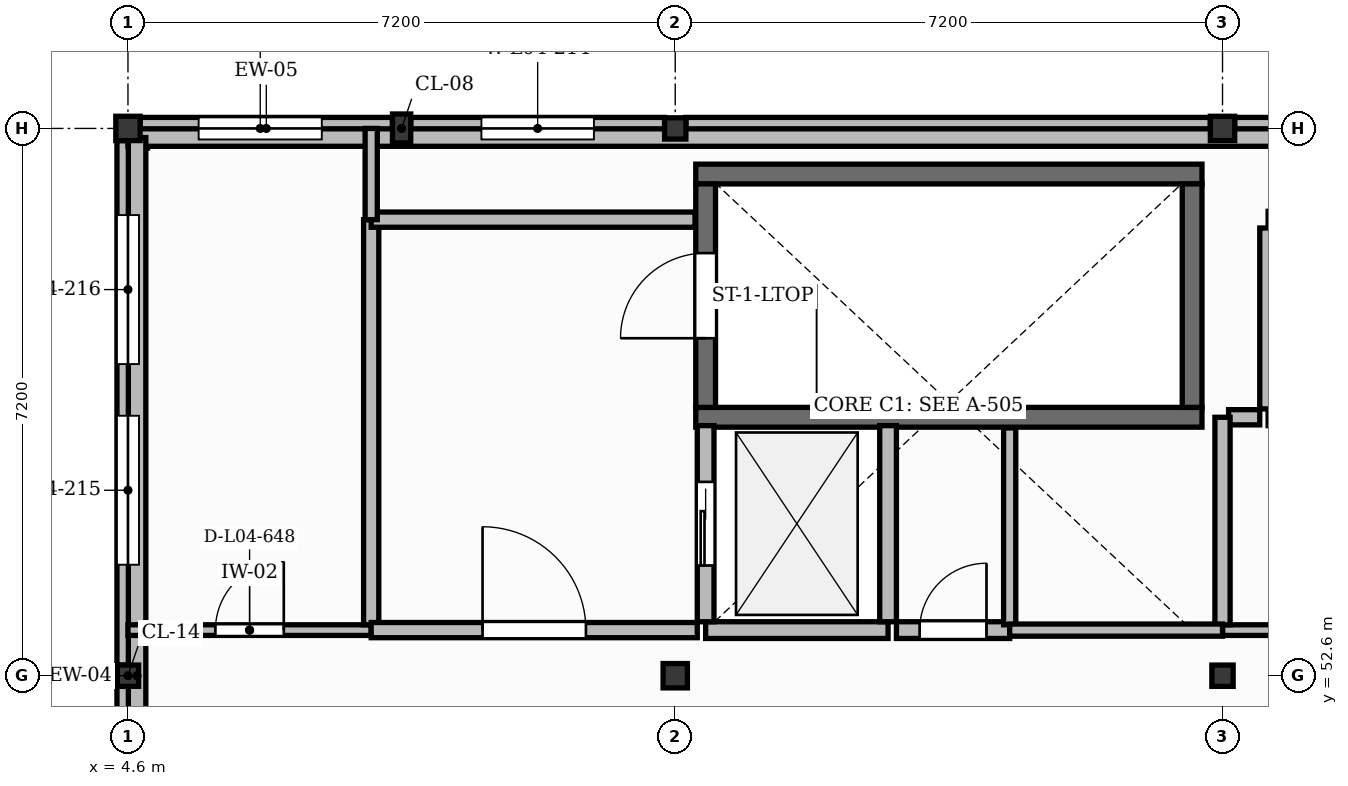
"""IFC4 building model, lengths in metres.
Left out: names, types, materials, properties, quantities, classifications, styles, units other than length and angle.
Written with IfcOpenShell. Run it as: python <this file> out.ifc"""

import sys

from ifc_helpers import new_model, si_unit, direction, frame, frame_2d, origin, origin_2d, place, context, subcontext, project, spatial, polyline, rectangle, outline, extrude, element, fill, save


model = new_model("IFC4")
c1 = context("Model", 3, precision=1e-05, world=origin(), true_north=direction((0.0, 1.0)))
c2 = subcontext(c1, "Body", "Model", "MODEL_VIEW")
j1 = project(units=[si_unit("LENGTHUNIT", "METRE"), si_unit("PLANEANGLEUNIT", "RADIAN")], contexts=[c1])
p1 = place(None, origin())
s1 = spatial("IfcSite", under=j1, at=p1, CompositionType="ELEMENT")
p2 = place(p1, origin())
s2 = spatial("IfcBuilding", under=s1, at=p2, CompositionType="ELEMENT")
p3 = place(p2, frame((0.0, 0.0, 17.4)))
s3 = spatial("IfcBuildingStorey", under=s2, at=p3, CompositionType="ELEMENT", Elevation=17.4)
p4 = place(p3, frame((4.6, 52.6, 0.0), z_axis=(0.0, 0.0, 1.0), x_axis=(1.0, 0.0, 0.0)))
e1 = element("IfcColumn", 1, at=p4, inside=s3, PredefinedType="COLUMN", context=c2, shape_type="SweptSolid", body=[
    extrude(rectangle(XDim=0.28, YDim=0.28, at=origin_2d()), origin(), (0.0, 0.0, 1.0), 3.95),
])
for number, where, z_axis, x_axis in (
    (2, (4.6, 59.8, 0.0), (0.0, 0.0, 1.0), (1.0, 0.0, 0.0)),
    (3, (11.8, 52.6, 0.0), (0.0, 0.0, 1.0), (1.0, 0.0, 0.0)),
):
    element("IfcColumn", number, at=place(p3, frame(where, z_axis=z_axis, x_axis=x_axis)), inside=s3, PredefinedType="COLUMN", context=c2, shape_type="SweptSolid", body=[
        extrude(rectangle(XDim=0.32, YDim=0.32, at=origin_2d()), origin(), (0.0, 0.0, 1.0), 3.95),
    ])
for number, where, z_axis, x_axis in (
    (4, (11.8, 59.8, 0.0), (0.0, 0.0, 1.0), (1.0, 0.0, 0.0)),
    (5, (19.0, 52.6, 0.0), (0.0, 0.0, 1.0), (1.0, 0.0, 0.0)),
):
    element("IfcColumn", number, at=place(p3, frame(where, z_axis=z_axis, x_axis=x_axis)), inside=s3, PredefinedType="COLUMN", context=c2, shape_type="SweptSolid", body=[
        extrude(rectangle(XDim=0.28, YDim=0.28, at=origin_2d()), origin(), (0.0, 0.0, 1.0), 3.95),
    ])
p5 = place(p3, frame((19.0, 59.8, 0.0), z_axis=(0.0, 0.0, 1.0), x_axis=(1.0, 0.0, 0.0)))
e6 = element("IfcColumn", 6, at=p5, inside=s3, PredefinedType="COLUMN", context=c2, shape_type="SweptSolid", body=[
    extrude(rectangle(XDim=0.32, YDim=0.32, at=origin_2d()), origin(), (0.0, 0.0, 1.0), 3.95),
])
p6 = place(p3, frame((8.2, 59.8, 0.0), z_axis=(0.0, 0.0, 1.0), x_axis=(1.0, 0.0, 0.0)))
e7 = element("IfcColumn", 7, at=p6, inside=s3, PredefinedType="PILASTER", context=c2, shape_type="SweptSolid", body=[
    extrude(rectangle(XDim=0.24, YDim=0.38, at=origin_2d()), origin(), (0.0, 0.0, 1.0), 3.95),
])
p7 = place(p3, frame((4.6, 45.56, 0.0), z_axis=(0.0, 0.0, 1.0), x_axis=(0.0, 1.0, 0.0)))
e8 = element("IfcWall", 8, at=p7, inside=s3, PredefinedType="SOLIDWALL", context=c2, shape_type="SweptSolid", body=[
    extrude(rectangle(XDim=6.9, YDim=0.29, at=frame_2d((3.45, 0.0))), origin(), (0.0, 0.0, 1.0), 3.49),
])
p8 = place(p7, frame((1.81, 0.0, 1.05)))
e9 = element("IfcOpeningElement", 9, at=p8, cuts=e8, PredefinedType="OPENING", context=c2, shape_type="SweptSolid", body=[
    extrude(rectangle(XDim=1.54, YDim=1.65, at=frame_2d((0.77, 0.825))), frame((0.0, 0.155, 0.0), z_axis=(0.0, -1.0, 0.0), x_axis=(1.0, 0.0, 0.0)), (0.0, 0.0, 1.0), 0.31),
])
p9 = place(p3, frame((4.76, 59.8, 0.0), z_axis=(0.0, 0.0, 1.0), x_axis=(1.0, 0.0, 0.0)))
e10 = element("IfcWall", 10, at=p9, inside=s3, PredefinedType="SOLIDWALL", context=c2, shape_type="SweptSolid", body=[
    extrude(rectangle(XDim=3.32, YDim=0.29, at=frame_2d((1.66, 0.0))), origin(), (0.0, 0.0, 1.0), 3.49),
])
p10 = place(p9, frame((0.77, 0.0, 1.0)))
e11 = element("IfcOpeningElement", 11, at=p10, cuts=e10, PredefinedType="OPENING", context=c2, shape_type="SweptSolid", body=[
    extrude(rectangle(XDim=1.62, YDim=1.95, at=frame_2d((0.81, 0.975))), frame((0.0, 0.155, 0.0), z_axis=(0.0, -1.0, 0.0), x_axis=(1.0, 0.0, 0.0)), (0.0, 0.0, 1.0), 0.31),
])
p11 = place(p3, frame((8.32, 59.8, 0.0), z_axis=(0.0, 0.0, 1.0), x_axis=(1.0, 0.0, 0.0)))
e12 = element("IfcWall", 12, at=p11, inside=s3, PredefinedType="SOLIDWALL", context=c2, shape_type="SweptSolid", body=[
    extrude(rectangle(XDim=3.34, YDim=0.29, at=frame_2d((1.67, 0.0))), origin(), (0.0, 0.0, 1.0), 3.49),
])
p12 = place(p11, frame((0.93, 0.0, 1.0)))
e13 = element("IfcOpeningElement", 13, at=p12, cuts=e12, PredefinedType="OPENING", context=c2, shape_type="SweptSolid", body=[
    extrude(rectangle(XDim=1.48, YDim=1.95, at=frame_2d((0.74, 0.975))), frame((0.0, 0.155, 0.0), z_axis=(0.0, -1.0, 0.0), x_axis=(1.0, 0.0, 0.0)), (0.0, 0.0, 1.0), 0.31),
])
p13 = place(p3, frame((4.6, 52.74, 0.0), z_axis=(0.0, 0.0, 1.0), x_axis=(0.0, 1.0, 0.0)))
e14 = element("IfcWall", 14, at=p13, inside=s3, PredefinedType="SOLIDWALL", context=c2, shape_type="SweptSolid", body=[
    extrude(rectangle(XDim=6.9, YDim=0.29, at=frame_2d((3.45, 0.0))), origin(), (0.0, 0.0, 1.0), 3.49),
])
p14 = place(p13, frame((1.32, 0.0, 1.05)))
e15 = element("IfcOpeningElement", 15, at=p14, cuts=e14, PredefinedType="OPENING", context=c2, shape_type="SweptSolid", body=[
    extrude(rectangle(XDim=1.96, YDim=1.65, at=frame_2d((0.98, 0.825))), frame((0.0, 0.155, 0.0), z_axis=(0.0, -1.0, 0.0), x_axis=(1.0, 0.0, 0.0)), (0.0, 0.0, 1.0), 0.31),
])
p15 = place(p13, frame((3.96, 0.0, 1.05)))
e16 = element("IfcOpeningElement", 16, at=p15, cuts=e14, PredefinedType="OPENING", context=c2, shape_type="SweptSolid", body=[
    extrude(rectangle(XDim=1.96, YDim=1.65, at=frame_2d((0.98, 0.825))), frame((0.0, 0.155, 0.0), z_axis=(0.0, -1.0, 0.0), x_axis=(1.0, 0.0, 0.0)), (0.0, 0.0, 1.0), 0.31),
])
p16 = place(p3, frame((11.94, 59.8, 0.0), z_axis=(0.0, 0.0, 1.0), x_axis=(1.0, 0.0, 0.0)))
e17 = element("IfcWall", 17, at=p16, inside=s3, PredefinedType="SOLIDWALL", context=c2, shape_type="SweptSolid", body=[
    extrude(rectangle(XDim=6.9, YDim=0.29, at=frame_2d((3.45, 0.0))), origin(), (0.0, 0.0, 1.0), 3.49),
])
p17 = place(p3, frame((19.16, 59.8, 0.0), z_axis=(0.0, 0.0, 1.0), x_axis=(1.0, 0.0, 0.0)))
e18 = element("IfcWall", 18, at=p17, inside=s3, PredefinedType="SOLIDWALL", context=c2, shape_type="SweptSolid", body=[
    extrude(rectangle(XDim=3.32, YDim=0.29, at=frame_2d((1.66, 0.0))), origin(), (0.0, 0.0, 1.0), 3.49),
])
p18 = place(p17, frame((0.75, 0.0, 1.05)))
e19 = element("IfcOpeningElement", 19, at=p18, cuts=e18, PredefinedType="OPENING", context=c2, shape_type="SweptSolid", body=[
    extrude(rectangle(XDim=1.26, YDim=1.65, at=frame_2d((0.63, 0.825))), frame((0.0, 0.155, 0.0), z_axis=(0.0, -1.0, 0.0), x_axis=(1.0, 0.0, 0.0)), (0.0, 0.0, 1.0), 0.31),
])
p19 = place(p3, frame((4.6, 59.68, 4.2), z_axis=(0.0, 0.0, 1.0), x_axis=(1.0, 0.0, 0.0)))
e20 = element("IfcWall", 20, at=p19, inside=s3, PredefinedType="PARAPET", context=c2, shape_type="SweptSolid", body=[
    extrude(outline(polyline([(0.0, 0.0), (50.4, 0.0), (50.4, 0.65), (39.312, 0.925), (39.312, 0.65), (32.256, 1.2), (32.256, 0.925), (18.144, 1.2), (18.144, 0.925), (11.088, 0.925), (11.088, 0.65), (0.0, 0.65), (0.0, 0.0)])), frame((0.0, 0.115, 0.0), z_axis=(0.0, -1.0, 0.0), x_axis=(1.0, 0.0, 0.0)), (0.0, 0.0, 1.0), 0.23),
])
p20 = place(p3, frame((4.72, 45.52, 4.2), z_axis=(0.0, 0.0, 1.0), x_axis=(0.0, 1.0, 0.0)))
e21 = element("IfcWall", 21, at=p20, inside=s3, PredefinedType="PARAPET", context=c2, shape_type="SweptSolid", body=[
    extrude(outline(polyline([(0.0, 0.0), (14.16, 0.0), (14.16, 0.65), (11.045, 0.9), (11.045, 0.65), (9.062, 1.15), (9.062, 0.9), (5.098, 1.15), (5.098, 0.9), (3.115, 0.9), (3.115, 0.65), (0.0, 0.65), (0.0, 0.0)])), frame((0.0, 0.115, 0.0), z_axis=(0.0, -1.0, 0.0), x_axis=(1.0, 0.0, 0.0)), (0.0, 0.0, 1.0), 0.23),
])
for number, where, z_axis, x_axis in (
    (22, (12.07, 56.0, 0.0), (0.0, 0.0, 1.0), (1.0, 0.0, 0.0)),
    (23, (12.07, 59.2, 0.0), (0.0, 0.0, 1.0), (1.0, 0.0, 0.0)),
):
    element("IfcWall", number, at=place(p3, frame(where, z_axis=z_axis, x_axis=x_axis)), inside=s3, PredefinedType="SHEAR", context=c2, shape_type="SweptSolid", body=[
        extrude(rectangle(XDim=6.66, YDim=0.26, at=frame_2d((3.33, 0.0))), origin(), (0.0, 0.0, 1.0), 3.95),
    ])
p21 = place(p3, frame((12.2, 56.13, 0.0), z_axis=(0.0, 0.0, 1.0), x_axis=(0.0, 1.0, 0.0)))
e24 = element("IfcWall", 24, at=p21, inside=s3, PredefinedType="SHEAR", context=c2, shape_type="SweptSolid", body=[
    extrude(rectangle(XDim=2.94, YDim=0.26, at=frame_2d((1.47, 0.0))), origin(), (0.0, 0.0, 1.0), 3.95),
])
p22 = place(p21, frame((0.91, 0.0, 0.0)))
e25 = element("IfcOpeningElement", 25, at=p22, cuts=e24, PredefinedType="OPENING", context=c2, shape_type="SweptSolid", body=[
    extrude(rectangle(XDim=1.12, YDim=2.1, at=frame_2d((0.56, 1.05))), frame((0.0, 0.14, 0.0), z_axis=(0.0, -1.0, 0.0), x_axis=(1.0, 0.0, 0.0)), (0.0, 0.0, 1.0), 0.28),
])
p23 = place(p3, frame((18.6, 56.13, 0.0), z_axis=(0.0, 0.0, 1.0), x_axis=(0.0, 1.0, 0.0)))
e26 = element("IfcWall", 26, at=p23, inside=s3, PredefinedType="SHEAR", context=c2, shape_type="SweptSolid", body=[
    extrude(rectangle(XDim=2.94, YDim=0.26, at=frame_2d((1.47, 0.0))), origin(), (0.0, 0.0, 1.0), 3.95),
])
p24 = place(p3, frame((12.2, 53.2, 0.0), z_axis=(0.0, 0.0, 1.0), x_axis=(1.0, 0.0, 0.0)))
e27 = element("IfcWall", 27, at=p24, inside=s3, PredefinedType="SOLIDWALL", context=c2, shape_type="SweptSolid", body=[
    extrude(rectangle(XDim=2.4, YDim=0.22, at=frame_2d((1.2, 0.0))), origin(), (0.0, 0.0, 1.0), 3.95),
])
p25 = place(p3, frame((12.2, 53.31, 0.0), z_axis=(0.0, 0.0, 1.0), x_axis=(0.0, 1.0, 0.0)))
e28 = element("IfcWall", 28, at=p25, inside=s3, PredefinedType="SOLIDWALL", context=c2, shape_type="SweptSolid", body=[
    extrude(rectangle(XDim=2.58, YDim=0.22, at=frame_2d((1.29, 0.0))), origin(), (0.0, 0.0, 1.0), 3.95),
])
p26 = place(p25, frame((0.74, 0.0, 0.0)))
e29 = element("IfcOpeningElement", 29, at=p26, cuts=e28, PredefinedType="OPENING", context=c2, shape_type="SweptSolid", body=[
    extrude(rectangle(XDim=1.1, YDim=2.15, at=frame_2d((0.55, 1.075))), frame((0.0, 0.12, 0.0), z_axis=(0.0, -1.0, 0.0), x_axis=(1.0, 0.0, 0.0)), (0.0, 0.0, 1.0), 0.24),
])
p27 = place(p3, frame((14.6, 53.31, 0.0), z_axis=(0.0, 0.0, 1.0), x_axis=(0.0, 1.0, 0.0)))
e30 = element("IfcWall", 30, at=p27, inside=s3, PredefinedType="SOLIDWALL", context=c2, shape_type="SweptSolid", body=[
    extrude(rectangle(XDim=2.58, YDim=0.22, at=frame_2d((1.29, 0.0))), origin(), (0.0, 0.0, 1.0), 3.95),
])
p28 = place(p3, frame((19.6, 56.11, 0.0), z_axis=(0.0, 0.0, 1.0), x_axis=(0.0, 1.0, 0.0)))
e31 = element("IfcWall", 31, at=p28, inside=s3, PredefinedType="SOLIDWALL", context=c2, shape_type="SweptSolid", body=[
    extrude(rectangle(XDim=2.38, YDim=0.22, at=frame_2d((1.19, 0.0))), origin(), (0.0, 0.0, 1.0), 3.95),
])
p29 = place(p3, frame((4.6, 53.2, 0.0), z_axis=(0.0, 0.0, 1.0), x_axis=(1.0, 0.0, 0.0)))
e32 = element("IfcWall", 32, at=p29, inside=s3, PredefinedType="PARTITIONING", context=c2, shape_type="SweptSolid", body=[
    extrude(rectangle(XDim=3.2, YDim=0.14, at=frame_2d((1.6, 0.0))), origin(), (0.0, 0.0, 1.0), 3.93),
])
p30 = place(p29, frame((1.15, 0.0, 0.0)))
e33 = element("IfcOpeningElement", 33, at=p30, cuts=e32, PredefinedType="OPENING", context=c2, shape_type="SweptSolid", body=[
    extrude(rectangle(XDim=0.9, YDim=2.1, at=frame_2d((0.45, 1.05))), frame((0.0, 0.08, 0.0), z_axis=(0.0, -1.0, 0.0), x_axis=(1.0, 0.0, 0.0)), (0.0, 0.0, 1.0), 0.16),
])
p31 = place(p3, frame((7.8, 53.27, 0.0), z_axis=(0.0, 0.0, 1.0), x_axis=(0.0, 1.0, 0.0)))
e34 = element("IfcWall", 34, at=p31, inside=s3, PredefinedType="PARTITIONING", context=c2, shape_type="SweptSolid", body=[
    extrude(rectangle(XDim=5.33, YDim=0.2, at=frame_2d((2.665, 0.0))), origin(), (0.0, 0.0, 1.0), 3.93),
])
p32 = place(p3, frame((7.8, 53.2, 0.0), z_axis=(0.0, 0.0, 1.0), x_axis=(1.0, 0.0, 0.0)))
e35 = element("IfcWall", 35, at=p32, inside=s3, PredefinedType="PARTITIONING", context=c2, shape_type="SweptSolid", body=[
    extrude(rectangle(XDim=4.29, YDim=0.2, at=frame_2d((2.145, 0.0))), origin(), (0.0, 0.0, 1.0), 3.93),
])
p33 = place(p32, frame((1.465, 0.0, 0.0)))
e36 = element("IfcOpeningElement", 36, at=p33, cuts=e35, PredefinedType="OPENING", context=c2, shape_type="SweptSolid", body=[
    extrude(rectangle(XDim=1.36, YDim=2.2, at=frame_2d((0.68, 1.1))), frame((0.0, 0.11, 0.0), z_axis=(0.0, -1.0, 0.0), x_axis=(1.0, 0.0, 0.0)), (0.0, 0.0, 1.0), 0.22),
])
p34 = place(p3, frame((14.71, 53.2, 0.0), z_axis=(0.0, 0.0, 1.0), x_axis=(1.0, 0.0, 0.0)))
e37 = element("IfcWall", 37, at=p34, inside=s3, PredefinedType="SOLIDWALL", context=c2, shape_type="SweptSolid", body=[
    extrude(rectangle(XDim=1.49, YDim=0.22, at=frame_2d((0.745, 0.0))), origin(), (0.0, 0.0, 1.0), 3.93),
])
p35 = place(p34, frame((0.305, 0.0, 0.0)))
e38 = element("IfcOpeningElement", 38, at=p35, cuts=e37, PredefinedType="OPENING", context=c2, shape_type="SweptSolid", body=[
    extrude(rectangle(XDim=0.88, YDim=2.05, at=frame_2d((0.44, 1.025))), frame((0.0, 0.12, 0.0), z_axis=(0.0, -1.0, 0.0), x_axis=(1.0, 0.0, 0.0)), (0.0, 0.0, 1.0), 0.24),
])
p36 = place(p3, frame((19.0, 53.2, 0.0), z_axis=(0.0, 0.0, 1.0), x_axis=(1.0, 0.0, 0.0)))
e39 = element("IfcWall", 39, at=p36, inside=s3, PredefinedType="PARTITIONING", context=c2, shape_type="SweptSolid", body=[
    extrude(rectangle(XDim=5.4, YDim=0.14, at=frame_2d((2.7, 0.0))), origin(), (0.0, 0.0, 1.0), 3.93),
])
p37 = place(p36, frame((2.09, 0.0, 0.0)))
e40 = element("IfcOpeningElement", 40, at=p37, cuts=e39, PredefinedType="OPENING", context=c2, shape_type="SweptSolid", body=[
    extrude(rectangle(XDim=1.22, YDim=2.1, at=frame_2d((0.61, 1.05))), frame((0.0, 0.08, 0.0), z_axis=(0.0, -1.0, 0.0), x_axis=(1.0, 0.0, 0.0)), (0.0, 0.0, 1.0), 0.16),
])
p38 = place(p36, frame((3.545, 0.0, 0.0)))
e41 = element("IfcOpeningElement", 41, at=p38, cuts=e39, PredefinedType="OPENING", context=c2, shape_type="SweptSolid", body=[
    extrude(rectangle(XDim=0.95, YDim=2.1, at=frame_2d((0.475, 1.05))), frame((0.0, 0.08, 0.0), z_axis=(0.0, -1.0, 0.0), x_axis=(1.0, 0.0, 0.0)), (0.0, 0.0, 1.0), 0.16),
])
p39 = place(p3, frame((16.2, 53.27, 0.0), z_axis=(0.0, 0.0, 1.0), x_axis=(0.0, 1.0, 0.0)))
e42 = element("IfcWall", 42, at=p39, inside=s3, PredefinedType="PARTITIONING", context=c2, shape_type="SweptSolid", body=[
    extrude(rectangle(XDim=2.59, YDim=0.16, at=frame_2d((1.295, 0.0))), origin(), (0.0, 0.0, 1.0), 3.93),
])
p40 = place(p3, frame((12.06, 58.6, 0.0), z_axis=(0.0, 0.0, 1.0), x_axis=(-1.0, 0.0, 0.0)))
e43 = element("IfcWall", 43, at=p40, inside=s3, PredefinedType="PARTITIONING", context=c2, shape_type="SweptSolid", body=[
    extrude(rectangle(XDim=4.26, YDim=0.2, at=frame_2d((2.13, 0.0))), origin(), (0.0, 0.0, 1.0), 3.93),
])
p41 = place(p3, frame((19.49, 56.0, 0.0), z_axis=(0.0, 0.0, 1.0), x_axis=(-1.0, 0.0, 0.0)))
e44 = element("IfcWall", 44, at=p41, inside=s3, PredefinedType="PARTITIONING", context=c2, shape_type="SweptSolid", body=[
    extrude(rectangle(XDim=0.41, YDim=0.2, at=frame_2d((0.205, 0.0))), origin(), (0.0, 0.0, 1.0), 3.93),
])
p42 = place(p3, frame((19.0, 53.27, 0.0), z_axis=(0.0, 0.0, 1.0), x_axis=(0.0, 1.0, 0.0)))
e45 = element("IfcWall", 45, at=p42, inside=s3, PredefinedType="PARTITIONING", context=c2, shape_type="SweptSolid", body=[
    extrude(rectangle(XDim=2.73, YDim=0.2, at=frame_2d((1.365, 0.0))), origin(), (0.0, 0.0, 1.0), 3.49),
])
p43 = place(p3, frame((19.0, 53.2, 0.0), z_axis=(0.0, 0.0, 1.0), x_axis=(-1.0, 0.0, 0.0)))
e46 = element("IfcWall", 46, at=p43, inside=s3, PredefinedType="PARTITIONING", context=c2, shape_type="SweptSolid", body=[
    extrude(rectangle(XDim=2.8, YDim=0.16, at=frame_2d((1.4, 0.0))), origin(), (0.0, 0.0, 1.0), 3.93),
])
p44 = place(p3, frame((7.8, 58.6, 0.0), z_axis=(0.0, 0.0, 1.0), x_axis=(0.0, 1.0, 0.0)))
e47 = element("IfcWall", 47, at=p44, inside=s3, PredefinedType="PARTITIONING", context=c2, shape_type="SweptSolid", body=[
    extrude(rectangle(XDim=1.2, YDim=0.16, at=frame_2d((0.6, 0.0))), origin(), (0.0, 0.0, 1.0), 3.93),
])
p45 = place(p10, origin())
e48 = element("IfcWindow", 48, at=p45, inside=s3, PartitioningType="DOUBLE_PANEL_VERTICAL", PredefinedType="WINDOW", context=c2, shape_type="SweptSolid", body=[
    extrude(rectangle(XDim=1.62, YDim=1.95, at=frame_2d((0.81, 0.975))), frame((0.0, 0.03, 0.0), z_axis=(0.0, -1.0, 0.0), x_axis=(1.0, 0.0, 0.0)), (0.0, 0.0, 1.0), 0.06),
])
fill(e11, e48)
p46 = place(p12, origin())
e49 = element("IfcWindow", 49, at=p46, inside=s3, PartitioningType="SINGLE_PANEL", PredefinedType="WINDOW", context=c2, shape_type="SweptSolid", body=[
    extrude(rectangle(XDim=1.48, YDim=1.95, at=frame_2d((0.74, 0.975))), frame((0.0, 0.03, 0.0), z_axis=(0.0, -1.0, 0.0), x_axis=(1.0, 0.0, 0.0)), (0.0, 0.0, 1.0), 0.06),
])
fill(e13, e49)
p47 = place(p14, origin())
e50 = element("IfcWindow", 50, at=p47, inside=s3, PartitioningType="DOUBLE_PANEL_VERTICAL", PredefinedType="WINDOW", context=c2, shape_type="SweptSolid", body=[
    extrude(rectangle(XDim=1.96, YDim=1.65, at=frame_2d((0.98, 0.825))), frame((0.0, 0.03, 0.0), z_axis=(0.0, -1.0, 0.0), x_axis=(1.0, 0.0, 0.0)), (0.0, 0.0, 1.0), 0.06),
])
fill(e15, e50)
p48 = place(p15, origin())
e51 = element("IfcWindow", 51, at=p48, inside=s3, PartitioningType="DOUBLE_PANEL_VERTICAL", PredefinedType="WINDOW", context=c2, shape_type="SweptSolid", body=[
    extrude(rectangle(XDim=1.96, YDim=1.65, at=frame_2d((0.98, 0.825))), frame((0.0, 0.03, 0.0), z_axis=(0.0, -1.0, 0.0), x_axis=(1.0, 0.0, 0.0)), (0.0, 0.0, 1.0), 0.06),
])
fill(e16, e51)
p49 = place(p26, origin())
e52 = element("IfcDoor", 52, at=p49, inside=s3, OperationType="SLIDING_TO_LEFT", PredefinedType="DOOR", context=c2, shape_type="SweptSolid", body=[
    extrude(rectangle(XDim=1.1, YDim=2.15, at=frame_2d((0.55, 1.075))), frame((0.0, 0.025, 0.0), z_axis=(0.0, -1.0, 0.0), x_axis=(1.0, 0.0, 0.0)), (0.0, 0.0, 1.0), 0.05),
])
fill(e29, e52)
p50 = place(p22, origin())
e53 = element("IfcDoor", 53, at=p50, inside=s3, OperationType="SINGLE_SWING_LEFT", PredefinedType="DOOR", context=c2, shape_type="SweptSolid", body=[
    extrude(rectangle(XDim=1.12, YDim=2.1, at=frame_2d((0.56, 1.05))), frame((0.0, 0.025, 0.0), z_axis=(0.0, -1.0, 0.0), x_axis=(1.0, 0.0, 0.0)), (0.0, 0.0, 1.0), 0.05),
])
fill(e25, e53)
p51 = place(p33, origin())
e54 = element("IfcDoor", 54, at=p51, inside=s3, OperationType="SINGLE_SWING_LEFT", PredefinedType="DOOR", context=c2, shape_type="SweptSolid", body=[
    extrude(rectangle(XDim=1.36, YDim=2.2, at=frame_2d((0.68, 1.1))), frame((0.0, 0.025, 0.0), z_axis=(0.0, -1.0, 0.0), x_axis=(1.0, 0.0, 0.0)), (0.0, 0.0, 1.0), 0.05),
])
fill(e36, e54)
p52 = place(p35, origin())
e55 = element("IfcDoor", 55, at=p52, inside=s3, OperationType="SINGLE_SWING_RIGHT", PredefinedType="DOOR", context=c2, shape_type="SweptSolid", body=[
    extrude(rectangle(XDim=0.88, YDim=2.05, at=frame_2d((0.44, 1.025))), frame((0.0, 0.025, 0.0), z_axis=(0.0, -1.0, 0.0), x_axis=(1.0, 0.0, 0.0)), (0.0, 0.0, 1.0), 0.05),
])
fill(e38, e55)
p53 = place(p30, origin())
e56 = element("IfcDoor", 56, at=p53, inside=s3, OperationType="SINGLE_SWING_RIGHT", PredefinedType="DOOR", context=c2, shape_type="SweptSolid", body=[
    extrude(rectangle(XDim=0.9, YDim=2.1, at=frame_2d((0.45, 1.05))), frame((0.0, 0.025, 0.0), z_axis=(0.0, -1.0, 0.0), x_axis=(1.0, 0.0, 0.0)), (0.0, 0.0, 1.0), 0.05),
])
fill(e33, e56)
save(model, sys.argv[1])
